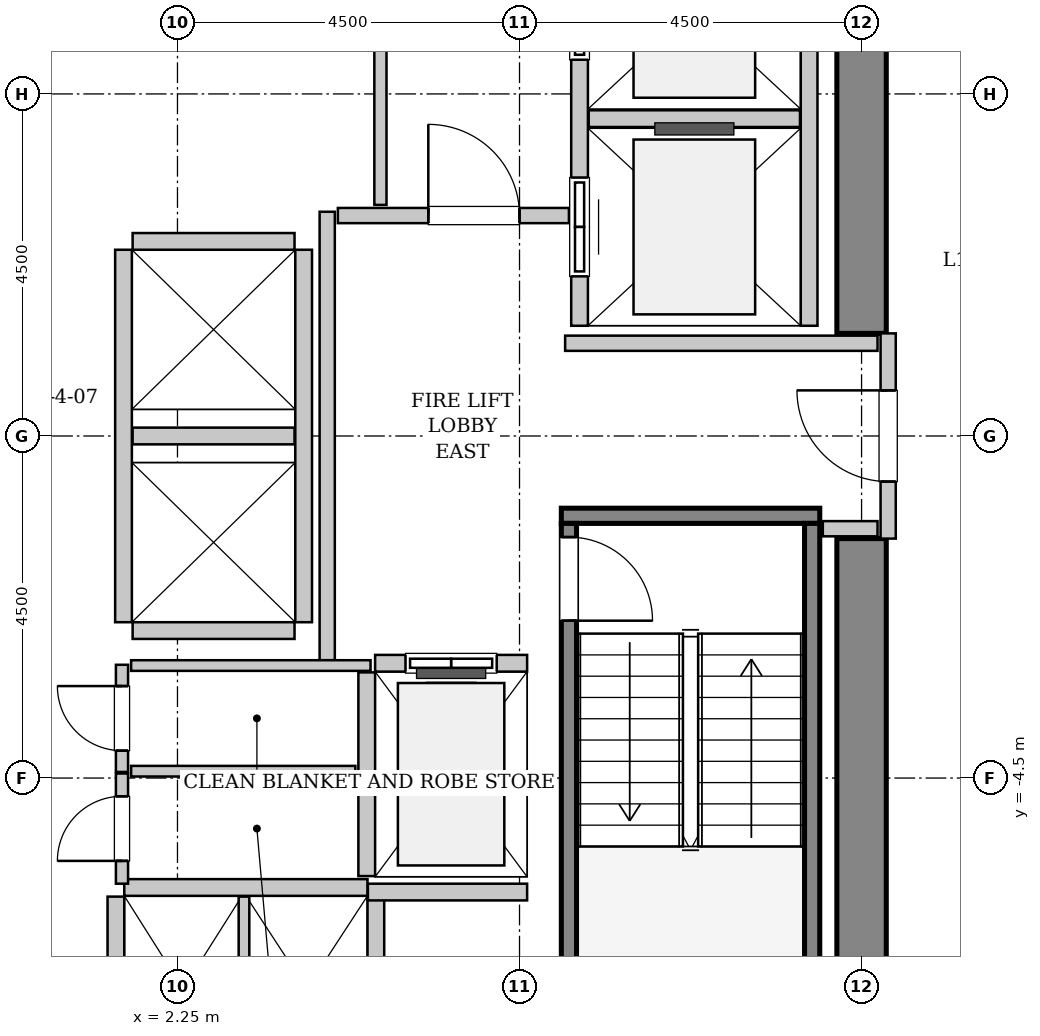
"""IFC4 building model, lengths in metres.
Left out: names, types, materials, properties, quantities, classifications, styles, units other than length and angle.
Written with IfcOpenShell. Run it as: python <this file> out.ifc"""

import sys

from ifc_helpers import new_model, si_unit, direction, frame, frame_2d, origin, place, context, subcontext, project, spatial, rectangle, extrude, source, transform, mapped, element, fill, save


model = new_model("IFC4")
c1 = context("Model", 3, precision=1e-05, world=origin(), true_north=direction((0.0, 1.0)))
c2 = subcontext(c1, "Body", "Model", "MODEL_VIEW")
j1 = project(units=[si_unit("LENGTHUNIT", "METRE"), si_unit("PLANEANGLEUNIT", "RADIAN")], contexts=[c1])
p1 = place(None, origin())
s1 = spatial("IfcSite", under=j1, at=p1, CompositionType="ELEMENT")
p2 = place(p1, origin())
s2 = spatial("IfcBuilding", under=s1, at=p2, CompositionType="ELEMENT")
p3 = place(p2, frame((0.0, 0.0, 74.8)))
s3 = spatial("IfcBuildingStorey", under=s2, at=p3, CompositionType="ELEMENT", Elevation=74.8)
m1 = source(origin(), c2, "Body", "SweptSolid", [
    extrude(rectangle(XDim=7.325, YDim=0.65, at=frame_2d((3.663, 0.0))), origin(), (0.0, 0.0, 1.0), 3.8),
])
for number, where, z_axis, x_axis in (
    (1, (11.25, -8.675, 0.0), (0.0, 0.0, 1.0), (0.0, 1.0, 0.0)),
    (2, (11.25, 1.35, 0.0), (0.0, 0.0, 1.0), (0.0, 1.0, 0.0)),
):
    element("IfcWall", number, at=place(p3, frame(where, z_axis=z_axis, x_axis=x_axis)), inside=s3, PredefinedType="SHEAR", context=c2, shape_type="MappedRepresentation", body=[
        mapped(m1, transform((0.0, 0.0, 0.0), x_axis=(1.0, 0.0, 0.0), y_axis=(0.0, 1.0, 0.0), z_axis=(0.0, 0.0, 1.0), scale=1.0)),
    ])
m2 = source(origin(), c2, "Body", "SweptSolid", [
    extrude(rectangle(XDim=3.4, YDim=0.2, at=frame_2d((1.7, 0.0))), origin(), (0.0, 0.0, 1.0), 3.8),
])
p4 = place(p3, frame((7.3, -1.05, 0.0), z_axis=(0.0, 0.0, 1.0), x_axis=(1.0, 0.0, 0.0)))
e3 = element("IfcWall", 3, at=p4, inside=s3, PredefinedType="SOLIDWALL", context=c2, shape_type="MappedRepresentation", body=[
    mapped(m2, transform((0.0, 0.0, 0.0), x_axis=(1.0, 0.0, 0.0), y_axis=(0.0, 1.0, 0.0), z_axis=(0.0, 0.0, 1.0), scale=1.0)),
])
m3 = source(origin(), c2, "Body", "SweptSolid", [
    extrude(rectangle(XDim=7.1, YDim=0.2, at=frame_2d((3.55, 0.0))), origin(), (0.0, 0.0, 1.0), 3.8),
])
p5 = place(p3, frame((7.4, -1.15, 0.0), z_axis=(0.0, 0.0, 1.0), x_axis=(0.0, -1.0, 0.0)))
e4 = element("IfcWall", 4, at=p5, inside=s3, PredefinedType="SOLIDWALL", context=c2, shape_type="MappedRepresentation", body=[
    mapped(m3, transform((0.0, 0.0, 0.0), x_axis=(1.0, 0.0, 0.0), y_axis=(0.0, 1.0, 0.0), z_axis=(0.0, 0.0, 1.0), scale=1.0)),
])
p6 = place(p5, frame((0.18, 0.0, 0.0)))
e5 = element("IfcOpeningElement", 5, at=p6, cuts=e4, PredefinedType="OPENING", context=c2, shape_type="SweptSolid", body=[
    extrude(rectangle(XDim=1.1, YDim=2.15, at=frame_2d((0.55, 1.075))), frame((0.0, 0.11, 0.0), z_axis=(0.0, -1.0, 0.0), x_axis=(1.0, 0.0, 0.0)), (0.0, 0.0, 1.0), 0.22),
])
p7 = place(p3, frame((10.6, -1.15, 0.0), z_axis=(0.0, 0.0, 1.0), x_axis=(0.0, -1.0, 0.0)))
e6 = element("IfcWall", 6, at=p7, inside=s3, PredefinedType="SOLIDWALL", context=c2, shape_type="MappedRepresentation", body=[
    mapped(m3, transform((0.0, 0.0, 0.0), x_axis=(1.0, 0.0, 0.0), y_axis=(0.0, 1.0, 0.0), z_axis=(0.0, 0.0, 1.0), scale=1.0)),
])
m4 = source(origin(), c2, "Body", "SweptSolid", [
    extrude(rectangle(XDim=2.0, YDim=0.22, at=frame_2d((1.0, 0.0))), origin(), (0.0, 0.0, 1.0), 3.535),
])
p8 = place(p3, frame((6.85, -2.99, 0.0), z_axis=(0.0, 0.0, 1.0), x_axis=(-1.0, 0.0, 0.0)))
e7 = element("IfcWall", 7, at=p8, inside=s3, PredefinedType="SOLIDWALL", context=c2, shape_type="MappedRepresentation", body=[
    mapped(m4, transform((0.0, 0.0, 0.0), x_axis=(1.0, 0.0, 0.0), y_axis=(0.0, 1.0, 0.0), z_axis=(0.0, 0.0, 1.0), scale=1.0)),
])
p9 = place(p8, frame((0.4, 0.0, 0.0)))
e8 = element("IfcOpeningElement", 8, at=p9, cuts=e7, PredefinedType="OPENING", context=c2, shape_type="SweptSolid", body=[
    extrude(rectangle(XDim=1.2, YDim=2.2, at=frame_2d((0.6, 1.1))), frame((0.0, 0.12, 0.0), z_axis=(0.0, -1.0, 0.0), x_axis=(1.0, 0.0, 0.0)), (0.0, 0.0, 1.0), 0.24),
])
m5 = source(origin(), c2, "Body", "SweptSolid", [
    extrude(rectangle(XDim=2.68, YDim=0.22, at=frame_2d((1.34, 0.0))), origin(), (0.0, 0.0, 1.0), 3.535),
])
p10 = place(p3, frame((4.74, -3.11, 0.0), z_axis=(0.0, 0.0, 1.0), x_axis=(0.0, -1.0, 0.0)))
e9 = element("IfcWall", 9, at=p10, inside=s3, PredefinedType="SOLIDWALL", context=c2, shape_type="MappedRepresentation", body=[
    mapped(m5, transform((0.0, 0.0, 0.0), x_axis=(1.0, 0.0, 0.0), y_axis=(0.0, 1.0, 0.0), z_axis=(0.0, 0.0, 1.0), scale=1.0)),
])
m6 = source(origin(), c2, "Body", "SweptSolid", [
    extrude(rectangle(XDim=5.45, YDim=0.22, at=frame_2d((2.725, 0.0))), origin(), (0.0, 0.0, 1.0), 3.535),
])
p11 = place(p3, frame((7.54, 6.9, 0.0), z_axis=(0.0, 0.0, 1.0), x_axis=(0.0, -1.0, 0.0)))
e10 = element("IfcWall", 10, at=p11, inside=s3, PredefinedType="SOLIDWALL", context=c2, shape_type="MappedRepresentation", body=[
    mapped(m6, transform((0.0, 0.0, 0.0), x_axis=(1.0, 0.0, 0.0), y_axis=(0.0, 1.0, 0.0), z_axis=(0.0, 0.0, 1.0), scale=1.0)),
])
p12 = place(p11, frame((3.5, 0.0, 0.0)))
e11 = element("IfcOpeningElement", 11, at=p12, cuts=e10, PredefinedType="OPENING", context=c2, shape_type="SweptSolid", body=[
    extrude(rectangle(XDim=1.3, YDim=2.3, at=frame_2d((0.65, 1.15))), frame((0.0, 0.12, 0.0), z_axis=(0.0, -1.0, 0.0), x_axis=(1.0, 0.0, 0.0)), (0.0, 0.0, 1.0), 0.24),
])
p13 = place(p11, frame((0.65, 0.0, 0.0)))
e12 = element("IfcOpeningElement", 12, at=p13, cuts=e10, PredefinedType="OPENING", context=c2, shape_type="SweptSolid", body=[
    extrude(rectangle(XDim=1.3, YDim=2.3, at=frame_2d((0.65, 1.15))), frame((0.0, 0.12, 0.0), z_axis=(0.0, -1.0, 0.0), x_axis=(1.0, 0.0, 0.0)), (0.0, 0.0, 1.0), 0.24),
])
p14 = place(p3, frame((10.56, 1.45, 0.0), z_axis=(0.0, 0.0, 1.0), x_axis=(0.0, 1.0, 0.0)))
e13 = element("IfcWall", 13, at=p14, inside=s3, PredefinedType="SOLIDWALL", context=c2, shape_type="MappedRepresentation", body=[
    mapped(m6, transform((0.0, 0.0, 0.0), x_axis=(1.0, 0.0, 0.0), y_axis=(0.0, 1.0, 0.0), z_axis=(0.0, 0.0, 1.0), scale=1.0)),
])
m7 = source(origin(), c2, "Body", "SweptSolid", [
    extrude(rectangle(XDim=2.78, YDim=0.22, at=frame_2d((1.39, 0.0))), origin(), (0.0, 0.0, 1.0), 3.535),
])
p15 = place(p3, frame((7.66, 4.175, 0.0), z_axis=(0.0, 0.0, 1.0), x_axis=(1.0, 0.0, 0.0)))
e14 = element("IfcWall", 14, at=p15, inside=s3, PredefinedType="SOLIDWALL", context=c2, shape_type="MappedRepresentation", body=[
    mapped(m7, transform((0.0, 0.0, 0.0), x_axis=(1.0, 0.0, 0.0), y_axis=(0.0, 1.0, 0.0), z_axis=(0.0, 0.0, 1.0), scale=1.0)),
])
m8 = source(origin(), c2, "Body", "SweptSolid", [
    extrude(rectangle(XDim=3.2, YDim=0.22, at=frame_2d((1.6, 0.0))), origin(), (0.0, 0.0, 1.0), 3.535),
])
p16 = place(p3, frame((4.75, -5.94, 0.0), z_axis=(0.0, 0.0, 1.0), x_axis=(-1.0, 0.0, 0.0)))
e15 = element("IfcWall", 15, at=p16, inside=s3, PredefinedType="SOLIDWALL", context=c2, shape_type="MappedRepresentation", body=[
    mapped(m8, transform((0.0, 0.0, 0.0), x_axis=(1.0, 0.0, 0.0), y_axis=(0.0, 1.0, 0.0), z_axis=(0.0, 0.0, 1.0), scale=1.0)),
])
m9 = source(origin(), c2, "Body", "SweptSolid", [
    extrude(rectangle(XDim=2.43, YDim=0.22, at=frame_2d((1.215, 0.0))), origin(), (0.0, 0.0, 1.0), 3.535),
])
p17 = place(p3, frame((1.44, -6.06, 0.0), z_axis=(0.0, 0.0, 1.0), x_axis=(0.0, -1.0, 0.0)))
e16 = element("IfcWall", 16, at=p17, inside=s3, PredefinedType="SOLIDWALL", context=c2, shape_type="MappedRepresentation", body=[
    mapped(m9, transform((0.0, 0.0, 0.0), x_axis=(1.0, 0.0, 0.0), y_axis=(0.0, 1.0, 0.0), z_axis=(0.0, 0.0, 1.0), scale=1.0)),
])
m10 = source(origin(), c2, "Body", "SweptSolid", [
    extrude(rectangle(XDim=2.43, YDim=0.14, at=frame_2d((1.215, 0.0))), origin(), (0.0, 0.0, 1.0), 3.535),
])
p18 = place(p3, frame((3.125, -8.49, 0.0), z_axis=(0.0, 0.0, 1.0), x_axis=(0.0, 1.0, 0.0)))
e17 = element("IfcWall", 17, at=p18, inside=s3, PredefinedType="PARTITIONING", context=c2, shape_type="MappedRepresentation", body=[
    mapped(m10, transform((0.0, 0.0, 0.0), x_axis=(1.0, 0.0, 0.0), y_axis=(0.0, 1.0, 0.0), z_axis=(0.0, 0.0, 1.0), scale=1.0)),
])
p19 = place(p3, frame((4.86, -8.49, 0.0), z_axis=(0.0, 0.0, 1.0), x_axis=(0.0, 1.0, 0.0)))
e18 = element("IfcWall", 18, at=p19, inside=s3, PredefinedType="SOLIDWALL", context=c2, shape_type="MappedRepresentation", body=[
    mapped(m9, transform((0.0, 0.0, 0.0), x_axis=(1.0, 0.0, 0.0), y_axis=(0.0, 1.0, 0.0), z_axis=(0.0, 0.0, 1.0), scale=1.0)),
])
m11 = source(origin(), c2, "Body", "SweptSolid", [
    extrude(rectangle(XDim=4.9, YDim=0.22, at=frame_2d((2.45, 0.0))), origin(), (0.0, 0.0, 1.0), 3.535),
])
for number, where, z_axis, x_axis in (
    (19, (1.54, 2.45, 0.0), (0.0, 0.0, 1.0), (0.0, -1.0, 0.0)),
    (20, (3.91, -2.45, 0.0), (0.0, 0.0, 1.0), (0.0, 1.0, 0.0)),
):
    element("IfcWall", number, at=place(p3, frame(where, z_axis=z_axis, x_axis=x_axis)), inside=s3, PredefinedType="SOLIDWALL", context=c2, shape_type="MappedRepresentation", body=[
        mapped(m11, transform((0.0, 0.0, 0.0), x_axis=(1.0, 0.0, 0.0), y_axis=(0.0, 1.0, 0.0), z_axis=(0.0, 0.0, 1.0), scale=1.0)),
    ])
m12 = source(origin(), c2, "Body", "SweptSolid", [
    extrude(rectangle(XDim=2.13, YDim=0.22, at=frame_2d((1.065, 0.0))), origin(), (0.0, 0.0, 1.0), 3.535),
])
for number, where, z_axis, x_axis in (
    (21, (1.66, -2.56, 0.0), (0.0, 0.0, 1.0), (1.0, 0.0, 0.0)),
    (22, (1.66, 0.0, 0.0), (0.0, 0.0, 1.0), (1.0, 0.0, 0.0)),
    (23, (3.79, 2.56, 0.0), (0.0, 0.0, 1.0), (-1.0, 0.0, 0.0)),
):
    element("IfcWall", number, at=place(p3, frame(where, z_axis=z_axis, x_axis=x_axis)), inside=s3, PredefinedType="SOLIDWALL", context=c2, shape_type="MappedRepresentation", body=[
        mapped(m12, transform((0.0, 0.0, 0.0), x_axis=(1.0, 0.0, 0.0), y_axis=(0.0, 1.0, 0.0), z_axis=(0.0, 0.0, 1.0), scale=1.0)),
    ])
m13 = source(origin(), c2, "Body", "SweptSolid", [
    extrude(rectangle(XDim=2.095, YDim=0.22, at=frame_2d((1.048, 0.0))), origin(), (0.0, 0.0, 1.0), 3.535),
])
p20 = place(p3, frame((4.755, -6.0, 0.0), z_axis=(0.0, 0.0, 1.0), x_axis=(1.0, 0.0, 0.0)))
e24 = element("IfcWall", 24, at=p20, inside=s3, PredefinedType="SOLIDWALL", context=c2, shape_type="MappedRepresentation", body=[
    mapped(m13, transform((0.0, 0.0, 0.0), x_axis=(1.0, 0.0, 0.0), y_axis=(0.0, 1.0, 0.0), z_axis=(0.0, 0.0, 1.0), scale=1.0)),
])
m14 = source(origin(), c2, "Body", "SweptSolid", [
    extrude(rectangle(XDim=2.7, YDim=0.2, at=frame_2d((1.35, 0.0))), origin(), (0.0, 0.0, 1.0), 2.425),
])
p21 = place(p3, frame((11.6, -1.35, 0.0), z_axis=(0.0, 0.0, 1.0), x_axis=(0.0, 1.0, 0.0)))
e25 = element("IfcWall", 25, at=p21, inside=s3, PredefinedType="PARTITIONING", context=c2, shape_type="MappedRepresentation", body=[
    mapped(m14, transform((0.0, 0.0, 0.0), x_axis=(1.0, 0.0, 0.0), y_axis=(0.0, 1.0, 0.0), z_axis=(0.0, 0.0, 1.0), scale=1.0)),
])
p22 = place(p21, frame((0.75, 0.0, 0.0)))
e26 = element("IfcOpeningElement", 26, at=p22, cuts=e25, PredefinedType="OPENING", context=c2, shape_type="SweptSolid", body=[
    extrude(rectangle(XDim=1.2, YDim=2.15, at=frame_2d((0.6, 1.075))), frame((0.0, 0.11, 0.0), z_axis=(0.0, -1.0, 0.0), x_axis=(1.0, 0.0, 0.0)), (0.0, 0.0, 1.0), 0.22),
])
m15 = source(origin(), c2, "Body", "SweptSolid", [
    extrude(rectangle(XDim=5.9, YDim=0.2, at=frame_2d((2.95, 0.0))), origin(), (0.0, 0.0, 1.0), 3.535),
])
p23 = place(p3, frame((4.22, -2.95, 0.0), z_axis=(0.0, 0.0, 1.0), x_axis=(0.0, 1.0, 0.0)))
e27 = element("IfcWall", 27, at=p23, inside=s3, PredefinedType="PARTITIONING", context=c2, shape_type="MappedRepresentation", body=[
    mapped(m15, transform((0.0, 0.0, 0.0), x_axis=(1.0, 0.0, 0.0), y_axis=(0.0, 1.0, 0.0), z_axis=(0.0, 0.0, 1.0), scale=1.0)),
])
m16 = source(origin(), c2, "Body", "SweptSolid", [
    extrude(rectangle(XDim=3.04, YDim=0.2, at=frame_2d((1.52, 0.0))), origin(), (0.0, 0.0, 1.0), 3.535),
])
p24 = place(p3, frame((4.36, 2.9, 0.0), z_axis=(0.0, 0.0, 1.0), x_axis=(1.0, 0.0, 0.0)))
e28 = element("IfcWall", 28, at=p24, inside=s3, PredefinedType="PARTITIONING", context=c2, shape_type="MappedRepresentation", body=[
    mapped(m16, transform((0.0, 0.0, 0.0), x_axis=(1.0, 0.0, 0.0), y_axis=(0.0, 1.0, 0.0), z_axis=(0.0, 0.0, 1.0), scale=1.0)),
])
p25 = place(p24, frame((1.19, 0.0, 0.0)))
e29 = element("IfcOpeningElement", 29, at=p25, cuts=e28, PredefinedType="OPENING", context=c2, shape_type="SweptSolid", body=[
    extrude(rectangle(XDim=1.2, YDim=2.15, at=frame_2d((0.6, 1.075))), frame((0.0, 0.11, 0.0), z_axis=(0.0, -1.0, 0.0), x_axis=(1.0, 0.0, 0.0)), (0.0, 0.0, 1.0), 0.22),
])
m17 = source(origin(), c2, "Body", "SweptSolid", [
    extrude(rectangle(XDim=4.11, YDim=0.2, at=frame_2d((2.055, 0.0))), origin(), (0.0, 0.0, 1.0), 3.535),
])
p26 = place(p3, frame((7.35, 1.22, 0.0), z_axis=(0.0, 0.0, 1.0), x_axis=(1.0, 0.0, 0.0)))
e30 = element("IfcWall", 30, at=p26, inside=s3, PredefinedType="PARTITIONING", context=c2, shape_type="MappedRepresentation", body=[
    mapped(m17, transform((0.0, 0.0, 0.0), x_axis=(1.0, 0.0, 0.0), y_axis=(0.0, 1.0, 0.0), z_axis=(0.0, 0.0, 1.0), scale=1.0)),
])
m18 = source(origin(), c2, "Body", "SweptSolid", [
    extrude(rectangle(XDim=0.72, YDim=0.2, at=frame_2d((0.36, 0.0))), origin(), (0.0, 0.0, 1.0), 3.535),
])
p27 = place(p3, frame((10.74, -1.22, 0.0), z_axis=(0.0, 0.0, 1.0), x_axis=(1.0, 0.0, 0.0)))
e31 = element("IfcWall", 31, at=p27, inside=s3, PredefinedType="PARTITIONING", context=c2, shape_type="MappedRepresentation", body=[
    mapped(m18, transform((0.0, 0.0, 0.0), x_axis=(1.0, 0.0, 0.0), y_axis=(0.0, 1.0, 0.0), z_axis=(0.0, 0.0, 1.0), scale=1.0)),
])
m19 = source(origin(), c2, "Body", "SweptSolid", [
    extrude(rectangle(XDim=3.015, YDim=0.16, at=frame_2d((1.507, 0.0))), origin(), (0.0, 0.0, 1.0), 3.535),
])
p28 = place(p3, frame((4.92, 3.04, 0.0), z_axis=(0.0, 0.0, 1.0), x_axis=(0.0, 1.0, 0.0)))
e32 = element("IfcWall", 32, at=p28, inside=s3, PredefinedType="PARTITIONING", context=c2, shape_type="MappedRepresentation", body=[
    mapped(m19, transform((0.0, 0.0, 0.0), x_axis=(1.0, 0.0, 0.0), y_axis=(0.0, 1.0, 0.0), z_axis=(0.0, 0.0, 1.0), scale=1.0)),
])
m20 = source(origin(), c2, "Body", "SweptSolid", [
    extrude(rectangle(XDim=1.41, YDim=0.16, at=frame_2d((0.705, 0.0))), origin(), (0.0, 0.0, 1.0), 3.535),
])
p29 = place(p3, frame((1.52, -4.42, 0.0), z_axis=(0.0, 0.0, 1.0), x_axis=(0.0, 1.0, 0.0)))
e33 = element("IfcWall", 33, at=p29, inside=s3, PredefinedType="PARTITIONING", context=c2, shape_type="MappedRepresentation", body=[
    mapped(m20, transform((0.0, 0.0, 0.0), x_axis=(1.0, 0.0, 0.0), y_axis=(0.0, 1.0, 0.0), z_axis=(0.0, 0.0, 1.0), scale=1.0)),
])
p30 = place(p29, frame((0.28, 0.0, 0.0)))
e34 = element("IfcOpeningElement", 34, at=p30, cuts=e33, PredefinedType="OPENING", context=c2, shape_type="SweptSolid", body=[
    extrude(rectangle(XDim=0.85, YDim=2.1, at=frame_2d((0.425, 1.05))), frame((0.0, 0.09, 0.0), z_axis=(0.0, -1.0, 0.0), x_axis=(1.0, 0.0, 0.0)), (0.0, 0.0, 1.0), 0.18),
])
m21 = source(origin(), c2, "Body", "SweptSolid", [
    extrude(rectangle(XDim=3.15, YDim=0.14, at=frame_2d((1.575, 0.0))), origin(), (0.0, 0.0, 1.0), 3.535),
])
p31 = place(p3, frame((1.64, -3.02, 0.0), z_axis=(0.0, 0.0, 1.0), x_axis=(1.0, 0.0, 0.0)))
e35 = element("IfcWall", 35, at=p31, inside=s3, PredefinedType="PARTITIONING", context=c2, shape_type="MappedRepresentation", body=[
    mapped(m21, transform((0.0, 0.0, 0.0), x_axis=(1.0, 0.0, 0.0), y_axis=(0.0, 1.0, 0.0), z_axis=(0.0, 0.0, 1.0), scale=1.0)),
])
m22 = source(origin(), c2, "Body", "SweptSolid", [
    extrude(rectangle(XDim=2.95, YDim=0.14, at=frame_2d((1.475, 0.0))), origin(), (0.0, 0.0, 1.0), 3.535),
])
p32 = place(p3, frame((1.64, -4.41, 0.0), z_axis=(0.0, 0.0, 1.0), x_axis=(1.0, 0.0, 0.0)))
e36 = element("IfcWall", 36, at=p32, inside=s3, PredefinedType="PARTITIONING", context=c2, shape_type="MappedRepresentation", body=[
    mapped(m22, transform((0.0, 0.0, 0.0), x_axis=(1.0, 0.0, 0.0), y_axis=(0.0, 1.0, 0.0), z_axis=(0.0, 0.0, 1.0), scale=1.0)),
])
m23 = source(origin(), c2, "Body", "SweptSolid", [
    extrude(rectangle(XDim=1.45, YDim=0.16, at=frame_2d((0.725, 0.0))), origin(), (0.0, 0.0, 1.0), 3.535),
])
p33 = place(p3, frame((1.52, -5.89, 0.0), z_axis=(0.0, 0.0, 1.0), x_axis=(0.0, 1.0, 0.0)))
e37 = element("IfcWall", 37, at=p33, inside=s3, PredefinedType="PARTITIONING", context=c2, shape_type="MappedRepresentation", body=[
    mapped(m23, transform((0.0, 0.0, 0.0), x_axis=(1.0, 0.0, 0.0), y_axis=(0.0, 1.0, 0.0), z_axis=(0.0, 0.0, 1.0), scale=1.0)),
])
p34 = place(p33, frame((0.3, 0.0, 0.0)))
e38 = element("IfcOpeningElement", 38, at=p34, cuts=e37, PredefinedType="OPENING", context=c2, shape_type="SweptSolid", body=[
    extrude(rectangle(XDim=0.85, YDim=2.1, at=frame_2d((0.425, 1.05))), frame((0.0, 0.09, 0.0), z_axis=(0.0, -1.0, 0.0), x_axis=(1.0, 0.0, 0.0)), (0.0, 0.0, 1.0), 0.18),
])
m24 = source(origin(), c2, "Body", "SweptSolid", [
    extrude(rectangle(XDim=1.1, YDim=2.15, at=frame_2d((0.55, 1.075))), frame((0.0, 0.025, 0.0), z_axis=(0.0, -1.0, 0.0), x_axis=(1.0, 0.0, 0.0)), (0.0, 0.0, 1.0), 0.05),
])
p35 = place(p6, origin())
e39 = element("IfcDoor", 39, at=p35, inside=s3, OperationType="SINGLE_SWING_RIGHT", PredefinedType="DOOR", context=c2, shape_type="MappedRepresentation", body=[
    mapped(m24, transform((0.0, 0.0, 0.0), x_axis=(1.0, 0.0, 0.0), y_axis=(0.0, 1.0, 0.0), z_axis=(0.0, 0.0, 1.0), scale=1.0)),
])
fill(e5, e39)
m25 = source(origin(), c2, "Body", "SweptSolid", [
    extrude(rectangle(XDim=1.2, YDim=2.2, at=frame_2d((0.6, 1.1))), frame((0.0, 0.025, 0.0), z_axis=(0.0, -1.0, 0.0), x_axis=(1.0, 0.0, 0.0)), (0.0, 0.0, 1.0), 0.05),
])
p36 = place(p9, origin())
e40 = element("IfcDoor", 40, at=p36, inside=s3, OperationType="SLIDING_TO_LEFT", PredefinedType="DOOR", context=c2, shape_type="MappedRepresentation", body=[
    mapped(m25, transform((0.0, 0.0, 0.0), x_axis=(1.0, 0.0, 0.0), y_axis=(0.0, 1.0, 0.0), z_axis=(0.0, 0.0, 1.0), scale=1.0)),
])
fill(e8, e40)
m26 = source(origin(), c2, "Body", "SweptSolid", [
    extrude(rectangle(XDim=1.3, YDim=2.3, at=frame_2d((0.65, 1.15))), frame((0.0, 0.025, 0.0), z_axis=(0.0, -1.0, 0.0), x_axis=(1.0, 0.0, 0.0)), (0.0, 0.0, 1.0), 0.05),
])
p37 = place(p12, origin())
e41 = element("IfcDoor", 41, at=p37, inside=s3, OperationType="SLIDING_TO_RIGHT", PredefinedType="DOOR", context=c2, shape_type="MappedRepresentation", body=[
    mapped(m26, transform((0.0, 0.0, 0.0), x_axis=(1.0, 0.0, 0.0), y_axis=(0.0, 1.0, 0.0), z_axis=(0.0, 0.0, 1.0), scale=1.0)),
])
fill(e11, e41)
p38 = place(p13, origin())
e42 = element("IfcDoor", 42, at=p38, inside=s3, OperationType="SLIDING_TO_RIGHT", PredefinedType="DOOR", context=c2, shape_type="MappedRepresentation", body=[
    mapped(m26, transform((0.0, 0.0, 0.0), x_axis=(1.0, 0.0, 0.0), y_axis=(0.0, 1.0, 0.0), z_axis=(0.0, 0.0, 1.0), scale=1.0)),
])
fill(e12, e42)
m27 = source(origin(), c2, "Body", "SweptSolid", [
    extrude(rectangle(XDim=1.2, YDim=2.15, at=frame_2d((0.6, 1.075))), frame((0.0, 0.025, 0.0), z_axis=(0.0, -1.0, 0.0), x_axis=(1.0, 0.0, 0.0)), (0.0, 0.0, 1.0), 0.05),
])
p39 = place(p22, origin())
e43 = element("IfcDoor", 43, at=p39, inside=s3, OperationType="SINGLE_SWING_RIGHT", PredefinedType="DOOR", context=c2, shape_type="MappedRepresentation", body=[
    mapped(m27, transform((0.0, 0.0, 0.0), x_axis=(1.0, 0.0, 0.0), y_axis=(0.0, 1.0, 0.0), z_axis=(0.0, 0.0, 1.0), scale=1.0)),
])
fill(e26, e43)
p40 = place(p25, origin())
e44 = element("IfcDoor", 44, at=p40, inside=s3, OperationType="SINGLE_SWING_LEFT", PredefinedType="DOOR", context=c2, shape_type="MappedRepresentation", body=[
    mapped(m27, transform((0.0, 0.0, 0.0), x_axis=(1.0, 0.0, 0.0), y_axis=(0.0, 1.0, 0.0), z_axis=(0.0, 0.0, 1.0), scale=1.0)),
])
fill(e29, e44)
m28 = source(origin(), c2, "Body", "SweptSolid", [
    extrude(rectangle(XDim=0.85, YDim=2.1, at=frame_2d((0.425, 1.05))), frame((0.0, 0.025, 0.0), z_axis=(0.0, -1.0, 0.0), x_axis=(1.0, 0.0, 0.0)), (0.0, 0.0, 1.0), 0.05),
])
p41 = place(p30, origin())
e45 = element("IfcDoor", 45, at=p41, inside=s3, OperationType="SINGLE_SWING_RIGHT", PredefinedType="DOOR", context=c2, shape_type="MappedRepresentation", body=[
    mapped(m28, transform((0.0, 0.0, 0.0), x_axis=(1.0, 0.0, 0.0), y_axis=(0.0, 1.0, 0.0), z_axis=(0.0, 0.0, 1.0), scale=1.0)),
])
fill(e34, e45)
p42 = place(p34, origin())
e46 = element("IfcDoor", 46, at=p42, inside=s3, OperationType="SINGLE_SWING_LEFT", PredefinedType="DOOR", context=c2, shape_type="MappedRepresentation", body=[
    mapped(m28, transform((0.0, 0.0, 0.0), x_axis=(1.0, 0.0, 0.0), y_axis=(0.0, 1.0, 0.0), z_axis=(0.0, 0.0, 1.0), scale=1.0)),
])
fill(e38, e46)
save(model, sys.argv[1])
